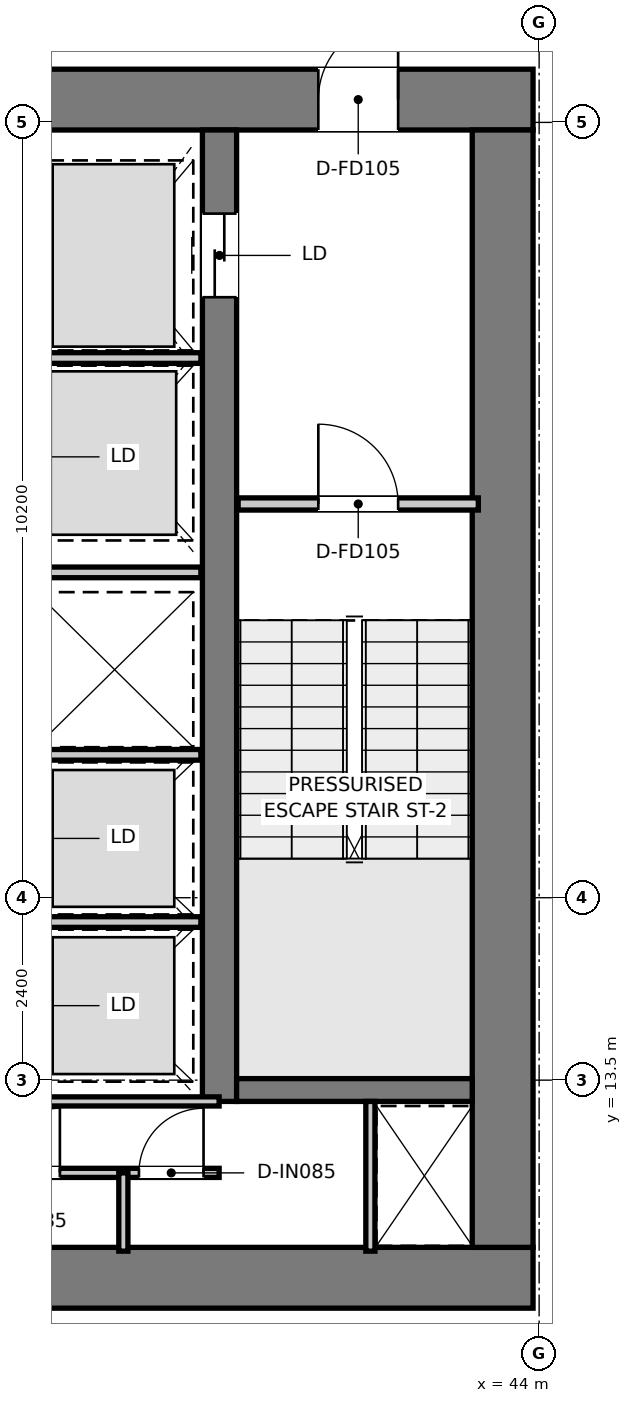
"""IFC4 building model, lengths in metres.
Left out: names, types, materials, properties, quantities, classifications, styles, units other than length and angle.
Written with IfcOpenShell. Run it as: python <this file> out.ifc"""

import sys

from ifc_helpers import new_model, si_unit, direction, frame, frame_2d, origin, place, context, subcontext, project, spatial, rectangle, extrude, element, fill, save


model = new_model("IFC4")
c1 = context("Model", 3, precision=1e-05, world=origin(), true_north=direction((0.0, 1.0)))
c2 = subcontext(c1, "Body", "Model", "MODEL_VIEW")
j1 = project(units=[si_unit("LENGTHUNIT", "METRE"), si_unit("PLANEANGLEUNIT", "RADIAN")], contexts=[c1])
p1 = place(None, origin())
s1 = spatial("IfcSite", under=j1, at=p1, CompositionType="ELEMENT")
p2 = place(p1, origin())
s2 = spatial("IfcBuilding", under=s1, at=p2, CompositionType="ELEMENT")
p3 = place(p2, frame((0.0, 0.0, 154.1)))
s3 = spatial("IfcBuildingStorey", under=s2, at=p3, CompositionType="ELEMENT", Elevation=154.1)
p4 = place(p3, frame((28.08, 10.9, 0.0), z_axis=(0.0, 0.0, 1.0), x_axis=(1.0, 0.0, 0.0)))
e1 = element("IfcWall", 1, at=p4, inside=s3, PredefinedType="SHEAR", context=c2, shape_type="SweptSolid", body=[
    extrude(rectangle(XDim=15.84, YDim=0.8, at=frame_2d((7.92, 0.0))), origin(), (0.0, 0.0, 1.0), 3.95),
])
p5 = place(p3, frame((28.08, 26.4, 0.0), z_axis=(0.0, 0.0, 1.0), x_axis=(1.0, 0.0, 0.0)))
e2 = element("IfcWall", 2, at=p5, inside=s3, PredefinedType="SHEAR", context=c2, shape_type="SweptSolid", body=[
    extrude(rectangle(XDim=15.84, YDim=0.8, at=frame_2d((7.92, 0.0))), origin(), (0.0, 0.0, 1.0), 3.95),
])
p6 = place(p5, frame((7.22, 0.0, 0.0)))
e3 = element("IfcOpeningElement", 3, at=p6, cuts=e2, PredefinedType="OPENING", context=c2, shape_type="SweptSolid", body=[
    extrude(rectangle(XDim=1.4, YDim=2.2, at=frame_2d((0.7, 1.1))), frame((0.0, 0.41, 0.0), z_axis=(0.0, -1.0, 0.0), x_axis=(1.0, 0.0, 0.0)), (0.0, 0.0, 1.0), 0.82),
])
p7 = place(p5, frame((1.775, 0.0, 0.0)))
e4 = element("IfcOpeningElement", 4, at=p7, cuts=e2, PredefinedType="OPENING", context=c2, shape_type="SweptSolid", body=[
    extrude(rectangle(XDim=1.05, YDim=2.1, at=frame_2d((0.525, 1.05))), frame((0.0, 0.41, 0.0), z_axis=(0.0, -1.0, 0.0), x_axis=(1.0, 0.0, 0.0)), (0.0, 0.0, 1.0), 0.82),
])
p8 = place(p5, frame((13.015, 0.0, 0.0)))
e5 = element("IfcOpeningElement", 5, at=p8, cuts=e2, PredefinedType="OPENING", context=c2, shape_type="SweptSolid", body=[
    extrude(rectangle(XDim=1.05, YDim=2.1, at=frame_2d((0.525, 1.05))), frame((0.0, 0.41, 0.0), z_axis=(0.0, -1.0, 0.0), x_axis=(1.0, 0.0, 0.0)), (0.0, 0.0, 1.0), 0.82),
])
p9 = place(p3, frame((43.52, 11.3, 0.0), z_axis=(0.0, 0.0, 1.0), x_axis=(0.0, 1.0, 0.0)))
e6 = element("IfcWall", 6, at=p9, inside=s3, PredefinedType="SHEAR", context=c2, shape_type="SweptSolid", body=[
    extrude(rectangle(XDim=14.7, YDim=0.8, at=frame_2d((7.35, 0.0))), origin(), (0.0, 0.0, 1.0), 3.95),
])
p10 = place(p3, frame((39.795, 13.22, 0.0), z_axis=(0.0, 0.0, 1.0), x_axis=(0.0, 1.0, 0.0)))
e7 = element("IfcWall", 7, at=p10, inside=s3, PredefinedType="SHEAR", context=c2, shape_type="SweptSolid", body=[
    extrude(rectangle(XDim=12.78, YDim=0.45, at=frame_2d((6.39, 0.0))), origin(), (0.0, 0.0, 1.0), 3.95),
])
p11 = place(p10, frame((10.58, 0.0, 0.0)))
e8 = element("IfcOpeningElement", 8, at=p11, cuts=e7, PredefinedType="OPENING", context=c2, shape_type="SweptSolid", body=[
    extrude(rectangle(XDim=1.1, YDim=2.15, at=frame_2d((0.55, 1.075))), frame((0.0, 0.235, 0.0), z_axis=(0.0, -1.0, 0.0), x_axis=(1.0, 0.0, 0.0)), (0.0, 0.0, 1.0), 0.47),
])
p12 = place(p3, frame((40.02, 13.37, 0.0), z_axis=(0.0, 0.0, 1.0), x_axis=(1.0, 0.0, 0.0)))
e9 = element("IfcWall", 9, at=p12, inside=s3, PredefinedType="SHEAR", context=c2, shape_type="SweptSolid", body=[
    extrude(rectangle(XDim=3.1, YDim=0.3, at=frame_2d((1.55, 0.0))), origin(), (0.0, 0.0, 1.0), 3.95),
])
p13 = place(p3, frame((40.04, 21.08, 0.0), z_axis=(0.0, 0.0, 1.0), x_axis=(1.0, 0.0, 0.0)))
e10 = element("IfcWall", 10, at=p13, inside=s3, PredefinedType="PARTITIONING", context=c2, shape_type="SweptSolid", body=[
    extrude(rectangle(XDim=3.16, YDim=0.16, at=frame_2d((1.58, 0.0))), origin(), (0.0, 0.0, 1.0), 3.67),
])
p14 = place(p13, frame((1.055, 0.0, 0.0)))
e11 = element("IfcOpeningElement", 11, at=p14, cuts=e10, PredefinedType="OPENING", context=c2, shape_type="SweptSolid", body=[
    extrude(rectangle(XDim=1.05, YDim=2.1, at=frame_2d((0.525, 1.05))), frame((0.0, 0.09, 0.0), z_axis=(0.0, -1.0, 0.0), x_axis=(1.0, 0.0, 0.0)), (0.0, 0.0, 1.0), 0.18),
])
p15 = place(p3, frame((37.28, 23.0, 0.0), z_axis=(0.0, 0.0, 1.0), x_axis=(1.0, 0.0, 0.0)))
e12 = element("IfcWall", 12, at=p15, inside=s3, PredefinedType="PARTITIONING", context=c2, shape_type="SweptSolid", body=[
    extrude(rectangle(XDim=2.27, YDim=0.14, at=frame_2d((1.135, 0.0))), origin(), (0.0, 0.0, 1.0), 2.67),
])
for number, where, z_axis, x_axis in (
    (13, (37.28, 17.78, 0.0), (0.0, 0.0, 1.0), (1.0, 0.0, 0.0)),
    (14, (37.28, 20.18, 0.0), (0.0, 0.0, 1.0), (1.0, 0.0, 0.0)),
    (15, (37.28, 15.58, 0.0), (0.0, 0.0, 1.0), (1.0, 0.0, 0.0)),
):
    element("IfcWall", number, at=place(p3, frame(where, z_axis=z_axis, x_axis=x_axis)), inside=s3, PredefinedType="PARTITIONING", context=c2, shape_type="SweptSolid", body=[
        extrude(rectangle(XDim=2.27, YDim=0.14, at=frame_2d((1.135, 0.0))), origin(), (0.0, 0.0, 1.0), 3.67),
    ])
p16 = place(p3, frame((41.78, 11.25, 0.0), z_axis=(0.0, 0.0, 1.0), x_axis=(0.0, 1.0, 0.0)))
e16 = element("IfcWall", 16, at=p16, inside=s3, PredefinedType="PARTITIONING", context=c2, shape_type="SweptSolid", body=[
    extrude(rectangle(XDim=1.97, YDim=0.12, at=frame_2d((0.985, 0.0))), origin(), (0.0, 0.0, 1.0), 3.67),
])
p17 = place(p3, frame((32.21, 13.22, 0.0), z_axis=(0.0, 0.0, 1.0), x_axis=(1.0, 0.0, 0.0)))
e17 = element("IfcWall", 17, at=p17, inside=s3, PredefinedType="PARTITIONING", context=c2, shape_type="SweptSolid", body=[
    extrude(rectangle(XDim=7.58, YDim=0.12, at=frame_2d((3.79, 0.0))), origin(), (0.0, 0.0, 1.0), 3.67),
])
p18 = place(p17, frame((3.365, 0.0, 0.0)))
e18 = element("IfcOpeningElement", 18, at=p18, cuts=e17, PredefinedType="OPENING", context=c2, shape_type="SweptSolid", body=[
    extrude(rectangle(XDim=0.85, YDim=2.1, at=frame_2d((0.425, 1.05))), frame((0.0, 0.07, 0.0), z_axis=(0.0, -1.0, 0.0), x_axis=(1.0, 0.0, 0.0)), (0.0, 0.0, 1.0), 0.14),
])
p19 = place(p3, frame((32.21, 12.28, 0.0), z_axis=(0.0, 0.0, 1.0), x_axis=(1.0, 0.0, 0.0)))
e19 = element("IfcWall", 19, at=p19, inside=s3, PredefinedType="PARTITIONING", context=c2, shape_type="SweptSolid", body=[
    extrude(rectangle(XDim=7.58, YDim=0.12, at=frame_2d((3.79, 0.0))), origin(), (0.0, 0.0, 1.0), 3.67),
])
p20 = place(p19, frame((0.205, 0.0, 0.0)))
e20 = element("IfcOpeningElement", 20, at=p20, cuts=e19, PredefinedType="OPENING", context=c2, shape_type="SweptSolid", body=[
    extrude(rectangle(XDim=0.85, YDim=2.1, at=frame_2d((0.425, 1.05))), frame((0.0, 0.07, 0.0), z_axis=(0.0, -1.0, 0.0), x_axis=(1.0, 0.0, 0.0)), (0.0, 0.0, 1.0), 0.14),
])
p21 = place(p19, frame((2.095, 0.0, 0.0)))
e21 = element("IfcOpeningElement", 21, at=p21, cuts=e19, PredefinedType="OPENING", context=c2, shape_type="SweptSolid", body=[
    extrude(rectangle(XDim=0.85, YDim=2.1, at=frame_2d((0.425, 1.05))), frame((0.0, 0.07, 0.0), z_axis=(0.0, -1.0, 0.0), x_axis=(1.0, 0.0, 0.0)), (0.0, 0.0, 1.0), 0.14),
])
p22 = place(p19, frame((4.635, 0.0, 0.0)))
e22 = element("IfcOpeningElement", 22, at=p22, cuts=e19, PredefinedType="OPENING", context=c2, shape_type="SweptSolid", body=[
    extrude(rectangle(XDim=0.85, YDim=2.1, at=frame_2d((0.425, 1.05))), frame((0.0, 0.07, 0.0), z_axis=(0.0, -1.0, 0.0), x_axis=(1.0, 0.0, 0.0)), (0.0, 0.0, 1.0), 0.14),
])
p23 = place(p19, frame((6.525, 0.0, 0.0)))
e23 = element("IfcOpeningElement", 23, at=p23, cuts=e19, PredefinedType="OPENING", context=c2, shape_type="SweptSolid", body=[
    extrude(rectangle(XDim=0.85, YDim=2.1, at=frame_2d((0.425, 1.05))), frame((0.0, 0.07, 0.0), z_axis=(0.0, -1.0, 0.0), x_axis=(1.0, 0.0, 0.0)), (0.0, 0.0, 1.0), 0.14),
])
p24 = place(p3, frame((38.53, 11.25, 0.0), z_axis=(0.0, 0.0, 1.0), x_axis=(0.0, 1.0, 0.0)))
e24 = element("IfcWall", 24, at=p24, inside=s3, PredefinedType="PARTITIONING", context=c2, shape_type="SweptSolid", body=[
    extrude(rectangle(XDim=1.03, YDim=0.12, at=frame_2d((0.515, 0.0))), origin(), (0.0, 0.0, 1.0), 3.67),
])
p25 = place(p14, origin())
e25 = element("IfcDoor", 25, at=p25, inside=s3, OperationType="SINGLE_SWING_LEFT", PredefinedType="DOOR", context=c2, shape_type="SweptSolid", body=[
    extrude(rectangle(XDim=1.05, YDim=2.1, at=frame_2d((0.525, 1.05))), frame((0.0, 0.025, 0.0), z_axis=(0.0, -1.0, 0.0), x_axis=(1.0, 0.0, 0.0)), (0.0, 0.0, 1.0), 0.05),
])
fill(e11, e25)
p26 = place(p8, origin())
e26 = element("IfcDoor", 26, at=p26, inside=s3, OperationType="SINGLE_SWING_RIGHT", PredefinedType="DOOR", context=c2, shape_type="SweptSolid", body=[
    extrude(rectangle(XDim=1.05, YDim=2.1, at=frame_2d((0.525, 1.05))), frame((0.0, 0.025, 0.0), z_axis=(0.0, -1.0, 0.0), x_axis=(1.0, 0.0, 0.0)), (0.0, 0.0, 1.0), 0.05),
])
fill(e5, e26)
p27 = place(p11, origin())
e27 = element("IfcDoor", 27, at=p27, inside=s3, OperationType="DOUBLE_DOOR_SLIDING", PredefinedType="DOOR", context=c2, shape_type="SweptSolid", body=[
    extrude(rectangle(XDim=1.1, YDim=2.15, at=frame_2d((0.55, 1.075))), frame((0.0, 0.025, 0.0), z_axis=(0.0, -1.0, 0.0), x_axis=(1.0, 0.0, 0.0)), (0.0, 0.0, 1.0), 0.05),
])
fill(e8, e27)
p28 = place(p22, origin())
e28 = element("IfcDoor", 28, at=p28, inside=s3, OperationType="SINGLE_SWING_RIGHT", PredefinedType="DOOR", context=c2, shape_type="SweptSolid", body=[
    extrude(rectangle(XDim=0.85, YDim=2.1, at=frame_2d((0.425, 1.05))), frame((0.0, 0.025, 0.0), z_axis=(0.0, -1.0, 0.0), x_axis=(1.0, 0.0, 0.0)), (0.0, 0.0, 1.0), 0.05),
])
fill(e22, e28)
p29 = place(p23, origin())
e29 = element("IfcDoor", 29, at=p29, inside=s3, OperationType="SINGLE_SWING_RIGHT", PredefinedType="DOOR", context=c2, shape_type="SweptSolid", body=[
    extrude(rectangle(XDim=0.85, YDim=2.1, at=frame_2d((0.425, 1.05))), frame((0.0, 0.025, 0.0), z_axis=(0.0, -1.0, 0.0), x_axis=(1.0, 0.0, 0.0)), (0.0, 0.0, 1.0), 0.05),
])
fill(e23, e29)
save(model, sys.argv[1])
